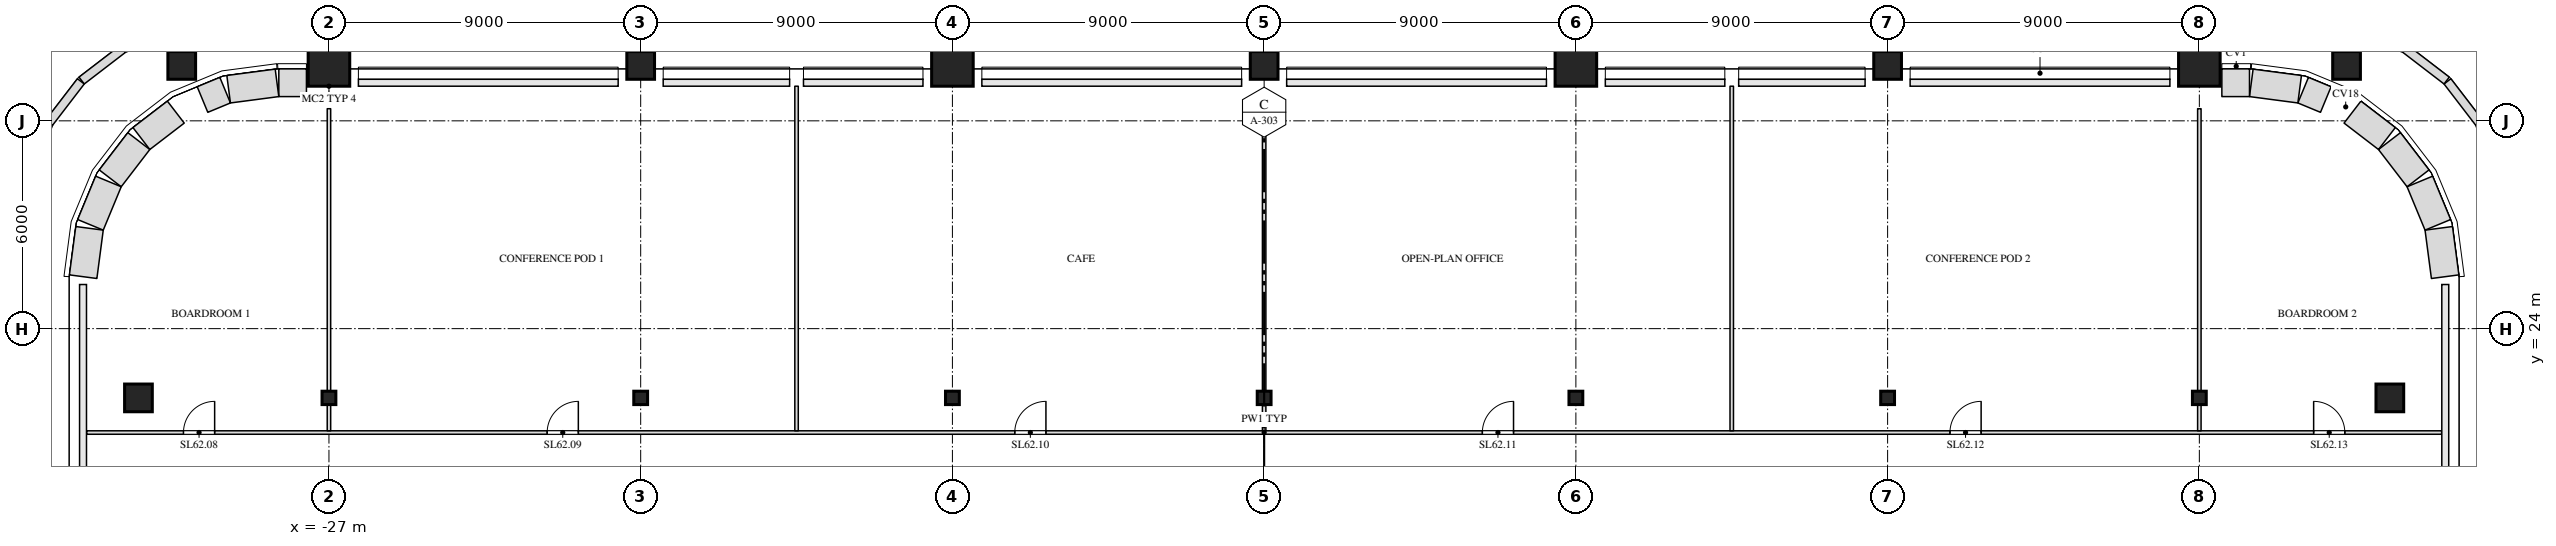
"""IFC4 building model, lengths in metres.
Left out: names, types, materials, properties, quantities, classifications, styles, units other than length and angle.
Written with IfcOpenShell. Run it as: python <this file> out.ifc"""

import sys

from ifc_helpers import new_model, si_unit, direction, frame, frame_2d, origin, origin_2d, place, context, subcontext, project, spatial, rectangle, i_section, extrude, clip, halfspace, element, fill, save


model = new_model("IFC4")
c1 = context("Model", 3, precision=1e-05, world=origin(), true_north=direction((0.0, 1.0)))
c2 = subcontext(c1, "Body", "Model", "MODEL_VIEW")
j1 = project(units=[si_unit("LENGTHUNIT", "METRE"), si_unit("PLANEANGLEUNIT", "RADIAN")], contexts=[c1])
p1 = place(None, origin())
s1 = spatial("IfcSite", under=j1, at=p1, CompositionType="ELEMENT")
p2 = place(p1, origin())
s2 = spatial("IfcBuilding", under=s1, at=p2, CompositionType="ELEMENT")
p3 = place(p2, frame((0.0, 0.0, 264.5)))
s3 = spatial("IfcBuildingStorey", under=s2, at=p3, CompositionType="ELEMENT", Elevation=264.5)
p4 = place(p3, frame((-32.5, 22.0, 0.0), z_axis=(0.0, 0.0, 1.0), x_axis=(1.0, 0.0, 0.0)))
e1 = element("IfcColumn", 1, at=p4, inside=s3, PredefinedType="COLUMN", context=c2, shape_type="SweptSolid", body=[
    extrude(rectangle(XDim=0.8, YDim=0.8, at=origin_2d()), origin(), (0.0, 0.0, 1.0), 4.0),
])
for number, where, z_axis, x_axis in (
    (2, (-27.0, 22.0, 0.0), (0.0, 0.0, 1.0), (1.0, 0.0, 0.0)),
    (3, (-18.0, 22.0, 0.0), (0.0, 0.0, 1.0), (1.0, 0.0, 0.0)),
    (4, (-9.0, 22.0, 0.0), (0.0, 0.0, 1.0), (1.0, 0.0, 0.0)),
    (5, (0.0, 22.0, 0.0), (0.0, 0.0, 1.0), (1.0, 0.0, 0.0)),
    (6, (9.0, 22.0, 0.0), (0.0, 0.0, 1.0), (1.0, 0.0, 0.0)),
    (7, (18.0, 22.0, 0.0), (0.0, 0.0, 1.0), (1.0, 0.0, 0.0)),
    (8, (27.0, 22.0, 0.0), (0.0, 0.0, 1.0), (1.0, 0.0, 0.0)),
):
    element("IfcColumn", number, at=place(p3, frame(where, z_axis=z_axis, x_axis=x_axis)), inside=s3, PredefinedType="COLUMN", context=c2, shape_type="SweptSolid", body=[
        extrude(i_section(OverallWidth=0.399, OverallDepth=0.386, WebThickness=0.021, FlangeThickness=0.033, at=origin_2d()), origin(), (0.0, 0.0, 1.0), 4.0),
    ])
p5 = place(p3, frame((32.5, 22.0, 0.0), z_axis=(0.0, 0.0, 1.0), x_axis=(1.0, 0.0, 0.0)))
e9 = element("IfcColumn", 9, at=p5, inside=s3, PredefinedType="COLUMN", context=c2, shape_type="SweptSolid", body=[
    extrude(rectangle(XDim=0.8, YDim=0.8, at=origin_2d()), origin(), (0.0, 0.0, 1.0), 4.0),
])
p6 = place(p3, frame((-31.25, 31.0, 0.0), z_axis=(0.0, 0.4472135955, 0.894427191), x_axis=(-1.0, 0.0, 0.0)))
e10 = element("IfcColumn", 10, at=p6, inside=s3, PredefinedType="COLUMN", context=c2, shape_type="Clipping", body=[
    clip(extrude(rectangle(XDim=0.8, YDim=0.8, at=origin_2d()), origin(), (0.0, 0.0, 1.0), 4.472), halfspace(frame((0.0, 0.0, 0.2)), True)),
])
p7 = place(p3, frame((-27.0, 31.0, 0.0), z_axis=(0.0, 0.4472135955, 0.894427191), x_axis=(-1.0, 0.0, 0.0)))
e11 = element("IfcColumn", 11, at=p7, inside=s3, PredefinedType="COLUMN", context=c2, shape_type="Clipping", body=[
    clip(extrude(rectangle(XDim=1.2, YDim=1.2, at=origin_2d()), origin(), (0.0, 0.0, 1.0), 4.472), halfspace(frame((0.0, 0.0, 0.3)), True)),
])
p8 = place(p3, frame((-18.0, 31.0, 0.0), z_axis=(0.0, 0.4472135955, 0.894427191), x_axis=(-1.0, 0.0, 0.0)))
e12 = element("IfcColumn", 12, at=p8, inside=s3, PredefinedType="COLUMN", context=c2, shape_type="Clipping", body=[
    clip(extrude(rectangle(XDim=0.8, YDim=0.8, at=origin_2d()), origin(), (0.0, 0.0, 1.0), 4.472), halfspace(frame((0.0, 0.0, 0.2)), True)),
])
p9 = place(p3, frame((-9.0, 31.0, 0.0), z_axis=(0.0, 0.4472135955, 0.894427191), x_axis=(-1.0, 0.0, 0.0)))
e13 = element("IfcColumn", 13, at=p9, inside=s3, PredefinedType="COLUMN", context=c2, shape_type="Clipping", body=[
    clip(extrude(rectangle(XDim=1.2, YDim=1.2, at=origin_2d()), origin(), (0.0, 0.0, 1.0), 4.472), halfspace(frame((0.0, 0.0, 0.3)), True)),
])
p10 = place(p3, frame((0.0, 31.0, 0.0), z_axis=(0.0, 0.4472135955, 0.894427191), x_axis=(-1.0, 0.0, 0.0)))
e14 = element("IfcColumn", 14, at=p10, inside=s3, PredefinedType="COLUMN", context=c2, shape_type="Clipping", body=[
    clip(extrude(rectangle(XDim=0.8, YDim=0.8, at=origin_2d()), origin(), (0.0, 0.0, 1.0), 4.472), halfspace(frame((0.0, 0.0, 0.2)), True)),
])
p11 = place(p3, frame((9.0, 31.0, 0.0), z_axis=(0.0, 0.4472135955, 0.894427191), x_axis=(-1.0, 0.0, 0.0)))
e15 = element("IfcColumn", 15, at=p11, inside=s3, PredefinedType="COLUMN", context=c2, shape_type="Clipping", body=[
    clip(extrude(rectangle(XDim=1.2, YDim=1.2, at=origin_2d()), origin(), (0.0, 0.0, 1.0), 4.472), halfspace(frame((0.0, 0.0, 0.3)), True)),
])
p12 = place(p3, frame((18.0, 31.0, 0.0), z_axis=(0.0, 0.4472135955, 0.894427191), x_axis=(-1.0, 0.0, 0.0)))
e16 = element("IfcColumn", 16, at=p12, inside=s3, PredefinedType="COLUMN", context=c2, shape_type="Clipping", body=[
    clip(extrude(rectangle(XDim=0.8, YDim=0.8, at=origin_2d()), origin(), (0.0, 0.0, 1.0), 4.472), halfspace(frame((0.0, 0.0, 0.2)), True)),
])
p13 = place(p3, frame((27.0, 31.0, 0.0), z_axis=(0.0, 0.4472135955, 0.894427191), x_axis=(-1.0, 0.0, 0.0)))
e17 = element("IfcColumn", 17, at=p13, inside=s3, PredefinedType="COLUMN", context=c2, shape_type="Clipping", body=[
    clip(extrude(rectangle(XDim=1.2, YDim=1.2, at=origin_2d()), origin(), (0.0, 0.0, 1.0), 4.472), halfspace(frame((0.0, 0.0, 0.3)), True)),
])
p14 = place(p3, frame((31.25, 31.0, 0.0), z_axis=(0.0, 0.4472135955, 0.894427191), x_axis=(-1.0, 0.0, 0.0)))
e18 = element("IfcColumn", 18, at=p14, inside=s3, PredefinedType="COLUMN", context=c2, shape_type="Clipping", body=[
    clip(extrude(rectangle(XDim=0.8, YDim=0.8, at=origin_2d()), origin(), (0.0, 0.0, 1.0), 4.472), halfspace(frame((0.0, 0.0, 0.2)), True)),
])
p15 = place(p3, frame((-33.996, 21.0, 0.0), z_axis=(0.0, 0.0, 1.0), x_axis=(1.0, 0.0, 0.0)))
e19 = element("IfcWall", 19, at=p15, inside=s3, PredefinedType="PARTITIONING", context=c2, shape_type="SweptSolid", body=[
    extrude(rectangle(XDim=67.992, YDim=0.1, at=frame_2d((33.996, 0.0))), origin(), (0.0, 0.0, 1.0), 3.65),
])
p16 = place(p15, frame((2.796, 0.0, 0.0)))
e20 = element("IfcOpeningElement", 20, at=p16, cuts=e19, PredefinedType="OPENING", context=c2, shape_type="SweptSolid", body=[
    extrude(rectangle(XDim=0.9, YDim=2.1, at=frame_2d((0.45, 1.05))), frame((0.0, 0.062, 0.0), z_axis=(0.0, -1.0, 0.0), x_axis=(1.0, 0.0, 0.0)), (0.0, 0.0, 1.0), 0.124),
])
p17 = place(p15, frame((13.296, 0.0, 0.0)))
e21 = element("IfcOpeningElement", 21, at=p17, cuts=e19, PredefinedType="OPENING", context=c2, shape_type="SweptSolid", body=[
    extrude(rectangle(XDim=0.9, YDim=2.1, at=frame_2d((0.45, 1.05))), frame((0.0, 0.062, 0.0), z_axis=(0.0, -1.0, 0.0), x_axis=(1.0, 0.0, 0.0)), (0.0, 0.0, 1.0), 0.124),
])
p18 = place(p15, frame((26.796, 0.0, 0.0)))
e22 = element("IfcOpeningElement", 22, at=p18, cuts=e19, PredefinedType="OPENING", context=c2, shape_type="SweptSolid", body=[
    extrude(rectangle(XDim=0.9, YDim=2.1, at=frame_2d((0.45, 1.05))), frame((0.0, 0.062, 0.0), z_axis=(0.0, -1.0, 0.0), x_axis=(1.0, 0.0, 0.0)), (0.0, 0.0, 1.0), 0.124),
])
p19 = place(p15, frame((40.296, 0.0, 0.0)))
e23 = element("IfcOpeningElement", 23, at=p19, cuts=e19, PredefinedType="OPENING", context=c2, shape_type="SweptSolid", body=[
    extrude(rectangle(XDim=0.9, YDim=2.1, at=frame_2d((0.45, 1.05))), frame((0.0, 0.062, 0.0), z_axis=(0.0, -1.0, 0.0), x_axis=(1.0, 0.0, 0.0)), (0.0, 0.0, 1.0), 0.124),
])
p20 = place(p15, frame((53.796, 0.0, 0.0)))
e24 = element("IfcOpeningElement", 24, at=p20, cuts=e19, PredefinedType="OPENING", context=c2, shape_type="SweptSolid", body=[
    extrude(rectangle(XDim=0.9, YDim=2.1, at=frame_2d((0.45, 1.05))), frame((0.0, 0.062, 0.0), z_axis=(0.0, -1.0, 0.0), x_axis=(1.0, 0.0, 0.0)), (0.0, 0.0, 1.0), 0.124),
])
p21 = place(p15, frame((64.296, 0.0, 0.0)))
e25 = element("IfcOpeningElement", 25, at=p21, cuts=e19, PredefinedType="OPENING", context=c2, shape_type="SweptSolid", body=[
    extrude(rectangle(XDim=0.9, YDim=2.1, at=frame_2d((0.45, 1.05))), frame((0.0, 0.062, 0.0), z_axis=(0.0, -1.0, 0.0), x_axis=(1.0, 0.0, 0.0)), (0.0, 0.0, 1.0), 0.124),
])
p22 = place(p3, frame((-27.0, 21.05, 0.0), z_axis=(0.0, 0.0, 1.0), x_axis=(0.0, 1.0, 0.0)))
e26 = element("IfcWall", 26, at=p22, inside=s3, PredefinedType="PARTITIONING", context=c2, shape_type="SweptSolid", body=[
    extrude(rectangle(XDim=0.757, YDim=0.1, at=frame_2d((0.378, 0.0))), origin(), (0.0, 0.0, 1.0), 3.043),
])
p23 = place(p3, frame((-27.0, 22.193, 0.0), z_axis=(0.0, 0.0, 1.0), x_axis=(0.0, 1.0, 0.0)))
e27 = element("IfcWall", 27, at=p23, inside=s3, PredefinedType="PARTITIONING", context=c2, shape_type="SweptSolid", body=[
    extrude(rectangle(XDim=8.157, YDim=0.1, at=frame_2d((4.079, 0.0))), origin(), (0.0, 0.0, 1.0), 3.65),
])
p24 = place(p3, frame((-13.5, 21.05, 0.0), z_axis=(0.0, 0.0, 1.0), x_axis=(0.0, 1.0, 0.0)))
e28 = element("IfcWall", 28, at=p24, inside=s3, PredefinedType="PARTITIONING", context=c2, shape_type="SweptSolid", body=[
    extrude(rectangle(XDim=9.95, YDim=0.1, at=frame_2d((4.975, 0.0))), origin(), (0.0, 0.0, 1.0), 3.65),
])
p25 = place(p3, frame((0.0, 21.05, 0.0), z_axis=(0.0, 0.0, 1.0), x_axis=(0.0, 1.0, 0.0)))
e29 = element("IfcWall", 29, at=p25, inside=s3, PredefinedType="PARTITIONING", context=c2, shape_type="SweptSolid", body=[
    extrude(rectangle(XDim=0.757, YDim=0.1, at=frame_2d((0.378, 0.0))), origin(), (0.0, 0.0, 1.0), 3.043),
])
p26 = place(p3, frame((0.0, 22.193, 0.0), z_axis=(0.0, 0.0, 1.0), x_axis=(0.0, 1.0, 0.0)))
e30 = element("IfcWall", 30, at=p26, inside=s3, PredefinedType="PARTITIONING", context=c2, shape_type="SweptSolid", body=[
    extrude(rectangle(XDim=8.357, YDim=0.1, at=frame_2d((4.178, 0.0))), origin(), (0.0, 0.0, 1.0), 3.65),
])
p27 = place(p3, frame((13.5, 21.05, 0.0), z_axis=(0.0, 0.0, 1.0), x_axis=(0.0, 1.0, 0.0)))
e31 = element("IfcWall", 31, at=p27, inside=s3, PredefinedType="PARTITIONING", context=c2, shape_type="SweptSolid", body=[
    extrude(rectangle(XDim=9.95, YDim=0.1, at=frame_2d((4.975, 0.0))), origin(), (0.0, 0.0, 1.0), 3.65),
])
p28 = place(p3, frame((27.0, 21.05, 0.0), z_axis=(0.0, 0.0, 1.0), x_axis=(0.0, 1.0, 0.0)))
e32 = element("IfcWall", 32, at=p28, inside=s3, PredefinedType="PARTITIONING", context=c2, shape_type="SweptSolid", body=[
    extrude(rectangle(XDim=0.757, YDim=0.1, at=frame_2d((0.378, 0.0))), origin(), (0.0, 0.0, 1.0), 3.043),
])
p29 = place(p3, frame((27.0, 22.193, 0.0), z_axis=(0.0, 0.0, 1.0), x_axis=(0.0, 1.0, 0.0)))
e33 = element("IfcWall", 33, at=p29, inside=s3, PredefinedType="PARTITIONING", context=c2, shape_type="SweptSolid", body=[
    extrude(rectangle(XDim=8.157, YDim=0.1, at=frame_2d((4.079, 0.0))), origin(), (0.0, 0.0, 1.0), 3.65),
])
p30 = place(p3, frame((34.097, 25.5, 0.0), z_axis=(0.0, 0.0, 1.0), x_axis=(-0.130517283865, 0.99144603414, 0.0)))
e34 = element("IfcWall", 34, at=p30, inside=s3, PredefinedType="SOLIDWALL", context=c2, shape_type="SweptSolid", body=[
    extrude(rectangle(XDim=1.408, YDim=0.8, at=frame_2d((0.704, 0.0))), origin(), (0.0, 0.0, 1.0), 3.65),
])
p31 = place(p3, frame((33.886, 26.997, 0.0), z_axis=(0.0, 0.0, 1.0), x_axis=(-0.38276009378, 0.923847774587, 0.0)))
e35 = element("IfcWall", 35, at=p31, inside=s3, PredefinedType="SOLIDWALL", context=c2, shape_type="SweptSolid", body=[
    extrude(rectangle(XDim=1.355, YDim=0.8, at=frame_2d((0.678, 0.0))), origin(), (0.0, 0.0, 1.0), 3.65),
])
p32 = place(p3, frame((33.315, 28.34, 0.0), z_axis=(0.0, 0.0, 1.0), x_axis=(-0.608866226366, 0.793272915452, 0.0)))
e36 = element("IfcWall", 36, at=p32, inside=s3, PredefinedType="SOLIDWALL", context=c2, shape_type="SweptSolid", body=[
    extrude(rectangle(XDim=1.356, YDim=0.8, at=frame_2d((0.678, 0.0))), origin(), (0.0, 0.0, 1.0), 3.65),
])
p33 = place(p3, frame((32.416, 29.489, 0.0), z_axis=(0.0, 0.0, 1.0), x_axis=(-0.793311514341, 0.608815933771, 0.0)))
e37 = element("IfcWall", 37, at=p33, inside=s3, PredefinedType="SOLIDWALL", context=c2, shape_type="SweptSolid", body=[
    extrude(rectangle(XDim=1.253, YDim=0.8, at=frame_2d((0.626, 0.0))), origin(), (0.0, 0.0, 1.0), 3.65),
])
p34 = place(p3, frame((30.651, 30.615, 0.0), z_axis=(0.0, 0.0, 1.0), x_axis=(-0.923810617216, 0.382849766253, 0.0)))
e38 = element("IfcWall", 38, at=p34, inside=s3, PredefinedType="SOLIDWALL", context=c2, shape_type="SweptSolid", body=[
    extrude(rectangle(XDim=0.707, YDim=0.8, at=frame_2d((0.354, 0.0))), origin(), (0.0, 0.0, 1.0), 3.65),
])
p35 = place(p3, frame((29.896, 30.913, 0.0), z_axis=(0.0, 0.0, 1.0), x_axis=(-0.99144603414, 0.130517283865, 0.0)))
e39 = element("IfcWall", 39, at=p35, inside=s3, PredefinedType="SOLIDWALL", context=c2, shape_type="SweptSolid", body=[
    extrude(rectangle(XDim=1.408, YDim=0.8, at=frame_2d((0.704, 0.0))), origin(), (0.0, 0.0, 1.0), 3.65),
])
for number, where, z_axis, x_axis in (
    (40, (28.448, 31.1, 0.0), (0.0, 0.0, 1.0), (-1.0, 0.0, 0.0)),
    (41, (-27.65, 31.1, 0.0), (0.0, 0.0, 1.0), (-1.0, 0.0, 0.0)),
):
    element("IfcWall", number, at=place(p3, frame(where, z_axis=z_axis, x_axis=x_axis)), inside=s3, PredefinedType="SOLIDWALL", context=c2, shape_type="SweptSolid", body=[
        extrude(rectangle(XDim=0.798, YDim=0.8, at=frame_2d((0.399, 0.0))), origin(), (0.0, 0.0, 1.0), 3.65),
    ])
p36 = place(p3, frame((-28.5, 31.097, 0.0), z_axis=(0.0, 0.0, 1.0), x_axis=(-0.99144603414, -0.130517283865, 0.0)))
e42 = element("IfcWall", 42, at=p36, inside=s3, PredefinedType="SOLIDWALL", context=c2, shape_type="SweptSolid", body=[
    extrude(rectangle(XDim=1.408, YDim=0.8, at=frame_2d((0.704, 0.0))), origin(), (0.0, 0.0, 1.0), 3.65),
])
p37 = place(p3, frame((-29.997, 30.886, 0.0), z_axis=(0.0, 0.0, 1.0), x_axis=(-0.923810617216, -0.382849766253, 0.0)))
e43 = element("IfcWall", 43, at=p37, inside=s3, PredefinedType="SOLIDWALL", context=c2, shape_type="SweptSolid", body=[
    extrude(rectangle(XDim=0.707, YDim=0.8, at=frame_2d((0.354, 0.0))), origin(), (0.0, 0.0, 1.0), 3.65),
])
p38 = place(p3, frame((-31.421, 30.252, 0.0), z_axis=(0.0, 0.0, 1.0), x_axis=(-0.793311514341, -0.608815933771, 0.0)))
e44 = element("IfcWall", 44, at=p38, inside=s3, PredefinedType="SOLIDWALL", context=c2, shape_type="SweptSolid", body=[
    extrude(rectangle(XDim=1.253, YDim=0.8, at=frame_2d((0.626, 0.0))), origin(), (0.0, 0.0, 1.0), 3.65),
])
p39 = place(p3, frame((-32.489, 29.416, 0.0), z_axis=(0.0, 0.0, 1.0), x_axis=(-0.608866226366, -0.793272915452, 0.0)))
e45 = element("IfcWall", 45, at=p39, inside=s3, PredefinedType="SOLIDWALL", context=c2, shape_type="SweptSolid", body=[
    extrude(rectangle(XDim=1.356, YDim=0.8, at=frame_2d((0.678, 0.0))), origin(), (0.0, 0.0, 1.0), 3.65),
])
p40 = place(p3, frame((-33.367, 28.25, 0.0), z_axis=(0.0, 0.0, 1.0), x_axis=(-0.38276009378, -0.923847774587, 0.0)))
e46 = element("IfcWall", 46, at=p40, inside=s3, PredefinedType="SOLIDWALL", context=c2, shape_type="SweptSolid", body=[
    extrude(rectangle(XDim=1.355, YDim=0.8, at=frame_2d((0.678, 0.0))), origin(), (0.0, 0.0, 1.0), 3.65),
])
p41 = place(p3, frame((-33.913, 26.896, 0.0), z_axis=(0.0, 0.0, 1.0), x_axis=(-0.130517283865, -0.99144603414, 0.0)))
e47 = element("IfcWall", 47, at=p41, inside=s3, PredefinedType="SOLIDWALL", context=c2, shape_type="SweptSolid", body=[
    extrude(rectangle(XDim=1.408, YDim=0.8, at=frame_2d((0.704, 0.0))), origin(), (0.0, 0.0, 1.0), 3.65),
])
for number, where, z_axis, x_axis in (
    (48, (35.667, 28.535, 0.0), (0.0, 0.0, 1.0), (-0.383, 0.924, 0.0)),
    (49, (35.077, 29.95, 0.0), (0.0, 0.0, 1.0), (-0.609, 0.793, 0.0)),
    (50, (34.14, 31.164, 0.0), (0.0, 0.0, 1.0), (-0.793, 0.609, 0.0)),
    (51, (32.922, 32.093, 0.0), (0.0, 0.0, 1.0), (-0.924, 0.383, 0.0)),
    (52, (-31.535, 32.667, 0.0), (0.0, 0.0, 1.0), (-0.924, -0.383, 0.0)),
    (53, (-32.95, 32.077, 0.0), (0.0, 0.0, 1.0), (-0.793, -0.609, 0.0)),
    (54, (-34.164, 31.14, 0.0), (0.0, 0.0, 1.0), (-0.609, -0.793, 0.0)),
    (55, (-35.093, 29.922, 0.0), (0.0, 0.0, 1.0), (-0.383, -0.924, 0.0)),
):
    element("IfcWall", number, at=place(p3, frame(where, z_axis=z_axis, x_axis=x_axis)), inside=s3, PredefinedType="PARAPET", context=c2, shape_type="SweptSolid", body=[
        extrude(rectangle(XDim=1.5, YDim=0.25, at=frame_2d((0.75, 0.0))), origin(), (0.0, 0.0, 1.0), 1.1),
    ])
p42 = place(p16, origin())
e56 = element("IfcDoor", 56, at=p42, inside=s3, OperationType="SINGLE_SWING_RIGHT", PredefinedType="DOOR", context=c2, shape_type="SweptSolid", body=[
    extrude(rectangle(XDim=0.9, YDim=2.1, at=frame_2d((0.45, 1.05))), frame((0.0, 0.025, 0.0), z_axis=(0.0, -1.0, 0.0), x_axis=(1.0, 0.0, 0.0)), (0.0, 0.0, 1.0), 0.05),
])
fill(e20, e56)
p43 = place(p17, origin())
e57 = element("IfcDoor", 57, at=p43, inside=s3, OperationType="SINGLE_SWING_RIGHT", PredefinedType="DOOR", context=c2, shape_type="SweptSolid", body=[
    extrude(rectangle(XDim=0.9, YDim=2.1, at=frame_2d((0.45, 1.05))), frame((0.0, 0.025, 0.0), z_axis=(0.0, -1.0, 0.0), x_axis=(1.0, 0.0, 0.0)), (0.0, 0.0, 1.0), 0.05),
])
fill(e21, e57)
p44 = place(p18, origin())
e58 = element("IfcDoor", 58, at=p44, inside=s3, OperationType="SINGLE_SWING_RIGHT", PredefinedType="DOOR", context=c2, shape_type="SweptSolid", body=[
    extrude(rectangle(XDim=0.9, YDim=2.1, at=frame_2d((0.45, 1.05))), frame((0.0, 0.025, 0.0), z_axis=(0.0, -1.0, 0.0), x_axis=(1.0, 0.0, 0.0)), (0.0, 0.0, 1.0), 0.05),
])
fill(e22, e58)
p45 = place(p19, origin())
e59 = element("IfcDoor", 59, at=p45, inside=s3, OperationType="SINGLE_SWING_RIGHT", PredefinedType="DOOR", context=c2, shape_type="SweptSolid", body=[
    extrude(rectangle(XDim=0.9, YDim=2.1, at=frame_2d((0.45, 1.05))), frame((0.0, 0.025, 0.0), z_axis=(0.0, -1.0, 0.0), x_axis=(1.0, 0.0, 0.0)), (0.0, 0.0, 1.0), 0.05),
])
fill(e23, e59)
p46 = place(p20, origin())
e60 = element("IfcDoor", 60, at=p46, inside=s3, OperationType="SINGLE_SWING_RIGHT", PredefinedType="DOOR", context=c2, shape_type="SweptSolid", body=[
    extrude(rectangle(XDim=0.9, YDim=2.1, at=frame_2d((0.45, 1.05))), frame((0.0, 0.025, 0.0), z_axis=(0.0, -1.0, 0.0), x_axis=(1.0, 0.0, 0.0)), (0.0, 0.0, 1.0), 0.05),
])
fill(e24, e60)
p47 = place(p21, origin())
e61 = element("IfcDoor", 61, at=p47, inside=s3, OperationType="SINGLE_SWING_LEFT", PredefinedType="DOOR", context=c2, shape_type="SweptSolid", body=[
    extrude(rectangle(XDim=0.9, YDim=2.1, at=frame_2d((0.45, 1.05))), frame((0.0, 0.025, 0.0), z_axis=(0.0, -1.0, 0.0), x_axis=(1.0, 0.0, 0.0)), (0.0, 0.0, 1.0), 0.05),
])
fill(e25, e61)
save(model, sys.argv[1])
